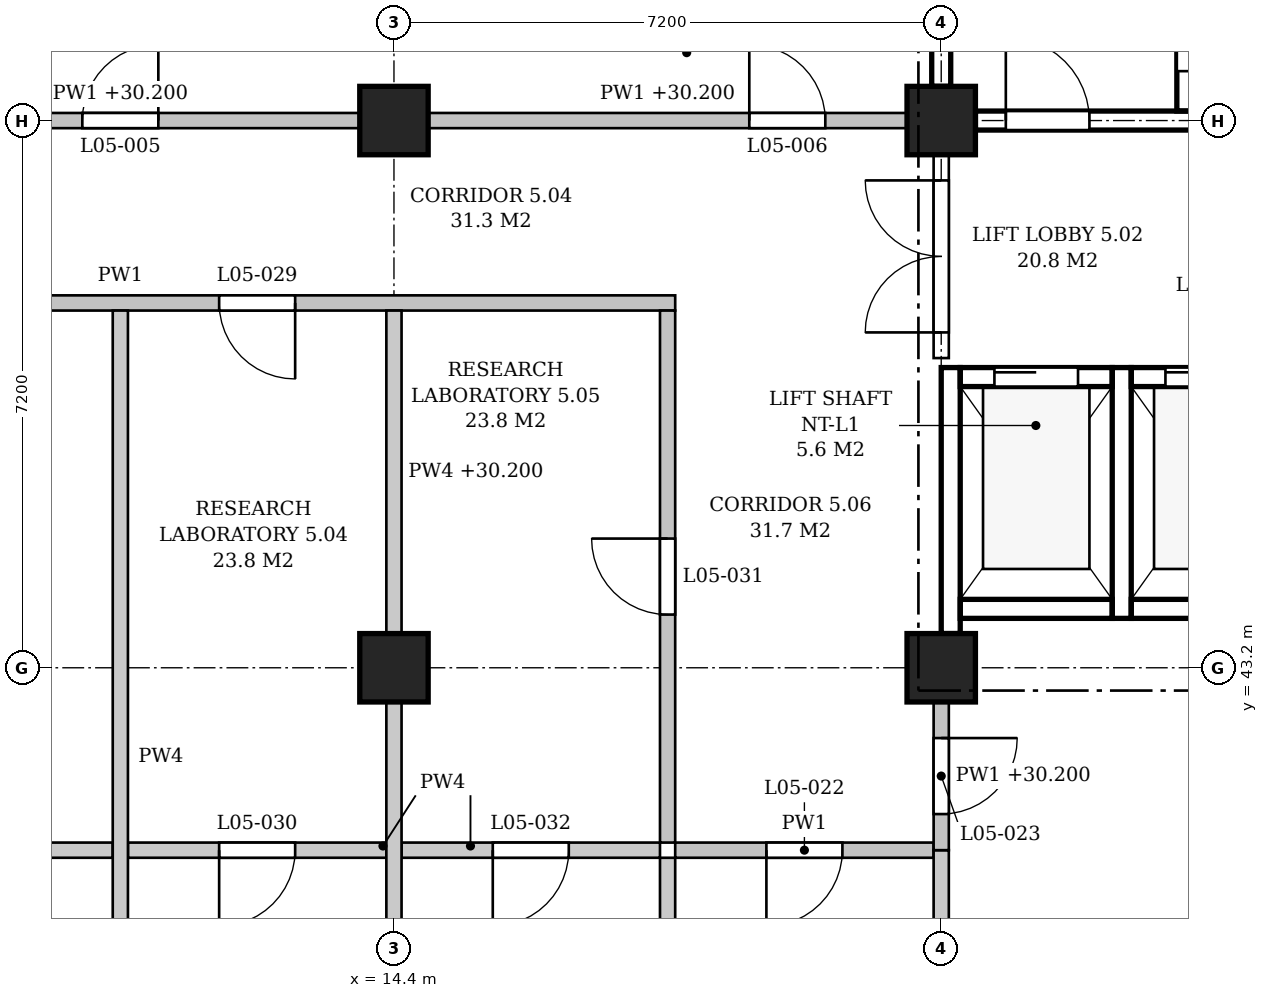
"""IFC4 building model, lengths in metres.
Left out: names, types, materials, properties, quantities, classifications, styles, units other than length and angle.
Written with IfcOpenShell. Run it as: python <this file> out.ifc"""

import sys

from ifc_helpers import new_model, si_unit, direction, frame, frame_2d, origin, origin_2d, place, context, subcontext, project, spatial, polyline, rectangle, outline, extrude, element, fill, save


model = new_model("IFC4")
c1 = context("Model", 3, precision=1e-05, world=origin(), true_north=direction((0.0, 1.0)))
c2 = subcontext(c1, "Body", "Model", "MODEL_VIEW")
j1 = project(units=[si_unit("LENGTHUNIT", "METRE"), si_unit("PLANEANGLEUNIT", "RADIAN")], contexts=[c1])
p1 = place(None, origin())
s1 = spatial("IfcSite", under=j1, at=p1, CompositionType="ELEMENT")
p2 = place(p1, origin())
s2 = spatial("IfcBuilding", under=s1, at=p2, CompositionType="ELEMENT")
p3 = place(p2, frame((0.0, 0.0, 26.4)))
s3 = spatial("IfcBuildingStorey", under=s2, at=p3, CompositionType="ELEMENT", Elevation=26.4)
for number, where, z_axis, x_axis in (
    (1, (14.4, 43.2, 0.0), (0.0, 0.0, 1.0), (1.0, 0.0, 0.0)),
    (2, (14.4, 50.4, 0.0), (0.0, 0.0, 1.0), (1.0, 0.0, 0.0)),
    (3, (21.6, 43.2, 0.0), (0.0, 0.0, 1.0), (1.0, 0.0, 0.0)),
    (4, (21.6, 50.4, 0.0), (0.0, 0.0, 1.0), (1.0, 0.0, 0.0)),
):
    element("IfcColumn", number, at=place(p3, frame(where, z_axis=z_axis, x_axis=x_axis)), inside=s3, PredefinedType="COLUMN", context=c2, shape_type="SweptSolid", body=[
        extrude(rectangle(XDim=0.9, YDim=0.9, at=origin_2d()), origin(), (0.0, 0.0, 1.0), 4.8),
    ])
p4 = place(p3, frame((22.05, 50.4, 0.0), z_axis=(0.0, 0.0, 1.0), x_axis=(1.0, 0.0, 0.0)))
e5 = element("IfcWall", 5, at=p4, inside=s3, PredefinedType="SHEAR", context=c2, shape_type="SweptSolid", body=[
    extrude(rectangle(XDim=6.3, YDim=0.25, at=frame_2d((3.15, 0.0))), origin(), (0.0, 0.0, 1.0), 3.8),
])
p5 = place(p4, frame((0.4, 0.0, 0.0)))
e6 = element("IfcOpeningElement", 6, at=p5, cuts=e5, PredefinedType="OPENING", context=c2, shape_type="SweptSolid", body=[
    extrude(rectangle(XDim=1.1, YDim=2.1, at=frame_2d((0.55, 1.05))), frame((0.0, 0.135, 0.0), z_axis=(0.0, -1.0, 0.0), x_axis=(1.0, 0.0, 0.0)), (0.0, 0.0, 1.0), 0.27),
])
p6 = place(p3, frame((21.6, 50.85, 0.0), z_axis=(0.0, 0.0, 1.0), x_axis=(0.0, 1.0, 0.0)))
e7 = element("IfcWall", 7, at=p6, inside=s3, PredefinedType="SHEAR", context=c2, shape_type="SweptSolid", body=[
    extrude(rectangle(XDim=6.3, YDim=0.25, at=frame_2d((3.15, 0.0))), origin(), (0.0, 0.0, 1.0), 3.8),
])
p7 = place(p3, frame((24.925, 50.525, 0.0), z_axis=(0.0, 0.0, 1.0), x_axis=(0.0, 1.0, 0.0)))
e8 = element("IfcWall", 8, at=p7, inside=s3, PredefinedType="SHEAR", context=c2, shape_type="SweptSolid", body=[
    extrude(rectangle(XDim=6.85, YDim=0.45, at=frame_2d((3.425, 0.0))), origin(), (0.0, 0.0, 1.0), 4.55),
])
p8 = place(p7, frame((0.525, 0.0, 0.0)))
e9 = element("IfcOpeningElement", 9, at=p8, cuts=e8, PredefinedType="OPENING", context=c2, shape_type="SweptSolid", body=[
    extrude(rectangle(XDim=1.0, YDim=2.1, at=frame_2d((0.5, 1.05))), frame((0.0, 0.235, 0.0), z_axis=(0.0, -1.0, 0.0), x_axis=(1.0, 0.0, 0.0)), (0.0, 0.0, 1.0), 0.47),
])
p9 = place(p3, frame((21.725, 43.65, -0.25), z_axis=(0.0, 0.0, 1.0), x_axis=(0.0, 1.0, 0.0)))
e10 = element("IfcWall", 10, at=p9, inside=s3, PredefinedType="SHEAR", context=c2, shape_type="SweptSolid", body=[
    extrude(rectangle(XDim=3.5, YDim=0.25, at=frame_2d((1.75, 0.0))), origin(), (0.0, 0.0, 1.0), 4.05),
])
p10 = place(p3, frame((23.975, 43.85, -0.25), z_axis=(0.0, 0.0, 1.0), x_axis=(0.0, 1.0, 0.0)))
e11 = element("IfcWall", 11, at=p10, inside=s3, PredefinedType="SHEAR", context=c2, shape_type="SweptSolid", body=[
    extrude(rectangle(XDim=3.3, YDim=0.25, at=frame_2d((1.65, 0.0))), origin(), (0.0, 0.0, 1.0), 4.8),
])
p11 = place(p3, frame((21.85, 47.025, -0.25), z_axis=(0.0, 0.0, 1.0), x_axis=(1.0, 0.0, 0.0)))
e12 = element("IfcWall", 12, at=p11, inside=s3, PredefinedType="SHEAR", context=c2, shape_type="SweptSolid", body=[
    extrude(rectangle(XDim=2.0, YDim=0.25, at=frame_2d((1.0, 0.0))), origin(), (0.0, 0.0, 1.0), 4.8),
])
p12 = place(p11, frame((0.45, 0.0, 0.25)))
e13 = element("IfcOpeningElement", 13, at=p12, cuts=e12, PredefinedType="OPENING", context=c2, shape_type="SweptSolid", body=[
    extrude(rectangle(XDim=1.1, YDim=2.1, at=frame_2d((0.55, 1.05))), frame((0.0, 0.135, 0.0), z_axis=(0.0, -1.0, 0.0), x_axis=(1.0, 0.0, 0.0)), (0.0, 0.0, 1.0), 0.27),
])
p13 = place(p3, frame((21.85, 43.975, -0.25), z_axis=(0.0, 0.0, 1.0), x_axis=(1.0, 0.0, 0.0)))
e14 = element("IfcWall", 14, at=p13, inside=s3, PredefinedType="SHEAR", context=c2, shape_type="SweptSolid", body=[
    extrude(rectangle(XDim=2.0, YDim=0.25, at=frame_2d((1.0, 0.0))), origin(), (0.0, 0.0, 1.0), 4.8),
])
p14 = place(p3, frame((24.1, 47.025, -0.25), z_axis=(0.0, 0.0, 1.0), x_axis=(1.0, 0.0, 0.0)))
e15 = element("IfcWall", 15, at=p14, inside=s3, PredefinedType="SHEAR", context=c2, shape_type="SweptSolid", body=[
    extrude(rectangle(XDim=2.0, YDim=0.25, at=frame_2d((1.0, 0.0))), origin(), (0.0, 0.0, 1.0), 4.8),
])
p15 = place(p14, frame((0.45, 0.0, 0.25)))
e16 = element("IfcOpeningElement", 16, at=p15, cuts=e15, PredefinedType="OPENING", context=c2, shape_type="SweptSolid", body=[
    extrude(rectangle(XDim=1.1, YDim=2.1, at=frame_2d((0.55, 1.05))), frame((0.0, 0.135, 0.0), z_axis=(0.0, -1.0, 0.0), x_axis=(1.0, 0.0, 0.0)), (0.0, 0.0, 1.0), 0.27),
])
p16 = place(p3, frame((24.1, 43.975, -0.25), z_axis=(0.0, 0.0, 1.0), x_axis=(1.0, 0.0, 0.0)))
e17 = element("IfcWall", 17, at=p16, inside=s3, PredefinedType="SHEAR", context=c2, shape_type="SweptSolid", body=[
    extrude(rectangle(XDim=2.0, YDim=0.25, at=frame_2d((1.0, 0.0))), origin(), (0.0, 0.0, 1.0), 4.8),
])
p17 = place(p3, frame((3.7, 40.8, 0.0), z_axis=(0.0, 0.0, 1.0), x_axis=(1.0, 0.0, 0.0)))
e18 = element("IfcWall", 18, at=p17, inside=s3, PredefinedType="PARTITIONING", context=c2, shape_type="SweptSolid", body=[
    extrude(outline(polyline([(0.0, 0.0), (7.0, 0.0), (7.0, 4.55), (3.75, 4.55), (3.75, 3.8), (3.25, 3.8), (3.25, 4.55), (0.0, 4.55), (0.0, 0.0)])), frame((0.0, 0.1, 0.0), z_axis=(0.0, -1.0, 0.0), x_axis=(1.0, 0.0, 0.0)), (0.0, 0.0, 1.0), 0.2),
])
p18 = place(p17, frame((1.25, 0.0, 0.0)))
e19 = element("IfcOpeningElement", 19, at=p18, cuts=e18, PredefinedType="OPENING", context=c2, shape_type="SweptSolid", body=[
    extrude(rectangle(XDim=1.0, YDim=2.1, at=frame_2d((0.5, 1.05))), frame((0.0, 0.11, 0.0), z_axis=(0.0, -1.0, 0.0), x_axis=(1.0, 0.0, 0.0)), (0.0, 0.0, 1.0), 0.22),
])
p19 = place(p17, frame((4.75, 0.0, 0.0)))
e20 = element("IfcOpeningElement", 20, at=p19, cuts=e18, PredefinedType="OPENING", context=c2, shape_type="SweptSolid", body=[
    extrude(rectangle(XDim=1.0, YDim=2.1, at=frame_2d((0.5, 1.05))), frame((0.0, 0.11, 0.0), z_axis=(0.0, -1.0, 0.0), x_axis=(1.0, 0.0, 0.0)), (0.0, 0.0, 1.0), 0.22),
])
p20 = place(p3, frame((10.9, 40.8, 0.0), z_axis=(0.0, 0.0, 1.0), x_axis=(1.0, 0.0, 0.0)))
e21 = element("IfcWall", 21, at=p20, inside=s3, PredefinedType="PARTITIONING", context=c2, shape_type="SweptSolid", body=[
    extrude(outline(polyline([(0.0, 0.0), (3.4, 0.0), (3.4, 3.8), (3.25, 3.8), (3.25, 4.55), (0.0, 4.55), (0.0, 0.0)])), frame((0.0, 0.1, 0.0), z_axis=(0.0, -1.0, 0.0), x_axis=(1.0, 0.0, 0.0)), (0.0, 0.0, 1.0), 0.2),
])
p21 = place(p20, frame((1.2, 0.0, 0.0)))
e22 = element("IfcOpeningElement", 22, at=p21, cuts=e21, PredefinedType="OPENING", context=c2, shape_type="SweptSolid", body=[
    extrude(rectangle(XDim=1.0, YDim=2.1, at=frame_2d((0.5, 1.05))), frame((0.0, 0.11, 0.0), z_axis=(0.0, -1.0, 0.0), x_axis=(1.0, 0.0, 0.0)), (0.0, 0.0, 1.0), 0.22),
])
p22 = place(p3, frame((14.5, 40.8, 0.0), z_axis=(0.0, 0.0, 1.0), x_axis=(1.0, 0.0, 0.0)))
e23 = element("IfcWall", 23, at=p22, inside=s3, PredefinedType="PARTITIONING", context=c2, shape_type="SweptSolid", body=[
    extrude(outline(polyline([(0.0, 0.0), (3.4, 0.0), (3.4, 4.55), (0.15, 4.55), (0.15, 3.8), (0.0, 3.8), (0.0, 0.0)])), frame((0.0, 0.1, 0.0), z_axis=(0.0, -1.0, 0.0), x_axis=(1.0, 0.0, 0.0)), (0.0, 0.0, 1.0), 0.2),
])
p23 = place(p22, frame((1.2, 0.0, 0.0)))
e24 = element("IfcOpeningElement", 24, at=p23, cuts=e23, PredefinedType="OPENING", context=c2, shape_type="SweptSolid", body=[
    extrude(rectangle(XDim=1.0, YDim=2.1, at=frame_2d((0.5, 1.05))), frame((0.0, 0.11, 0.0), z_axis=(0.0, -1.0, 0.0), x_axis=(1.0, 0.0, 0.0)), (0.0, 0.0, 1.0), 0.22),
])
p24 = place(p3, frame((18.1, 40.8, 0.0), z_axis=(0.0, 0.0, 1.0), x_axis=(1.0, 0.0, 0.0)))
e25 = element("IfcWall", 25, at=p24, inside=s3, PredefinedType="PARTITIONING", context=c2, shape_type="SweptSolid", body=[
    extrude(outline(polyline([(0.0, 0.0), (3.4, 0.0), (3.4, 3.8), (3.25, 3.8), (3.25, 4.55), (0.0, 4.55), (0.0, 0.0)])), frame((0.0, 0.1, 0.0), z_axis=(0.0, -1.0, 0.0), x_axis=(1.0, 0.0, 0.0)), (0.0, 0.0, 1.0), 0.2),
])
p25 = place(p24, frame((1.2, 0.0, 0.0)))
e26 = element("IfcOpeningElement", 26, at=p25, cuts=e25, PredefinedType="OPENING", context=c2, shape_type="SweptSolid", body=[
    extrude(rectangle(XDim=1.0, YDim=2.1, at=frame_2d((0.5, 1.05))), frame((0.0, 0.11, 0.0), z_axis=(0.0, -1.0, 0.0), x_axis=(1.0, 0.0, 0.0)), (0.0, 0.0, 1.0), 0.22),
])
p26 = place(p3, frame((3.5, 48.0, 0.0), z_axis=(0.0, 0.0, 1.0), x_axis=(1.0, 0.0, 0.0)))
e27 = element("IfcWall", 27, at=p26, inside=s3, PredefinedType="PARTITIONING", context=c2, shape_type="SweptSolid", body=[
    extrude(outline(polyline([(0.0, 0.0), (14.6, 0.0), (14.6, 4.55), (11.15, 4.55), (11.15, 3.8), (10.65, 3.8), (10.65, 4.55), (3.95, 4.55), (3.95, 3.8), (3.45, 3.8), (3.45, 4.55), (0.0, 4.55), (0.0, 0.0)])), frame((0.0, 0.1, 0.0), z_axis=(0.0, -1.0, 0.0), x_axis=(1.0, 0.0, 0.0)), (0.0, 0.0, 1.0), 0.2),
])
p27 = place(p26, frame((3.2, 0.0, 0.0)))
e28 = element("IfcOpeningElement", 28, at=p27, cuts=e27, PredefinedType="OPENING", context=c2, shape_type="SweptSolid", body=[
    extrude(rectangle(XDim=1.0, YDim=2.1, at=frame_2d((0.5, 1.05))), frame((0.0, 0.11, 0.0), z_axis=(0.0, -1.0, 0.0), x_axis=(1.0, 0.0, 0.0)), (0.0, 0.0, 1.0), 0.22),
])
p28 = place(p26, frame((8.6, 0.0, 0.0)))
e29 = element("IfcOpeningElement", 29, at=p28, cuts=e27, PredefinedType="OPENING", context=c2, shape_type="SweptSolid", body=[
    extrude(rectangle(XDim=1.0, YDim=2.1, at=frame_2d((0.5, 1.05))), frame((0.0, 0.11, 0.0), z_axis=(0.0, -1.0, 0.0), x_axis=(1.0, 0.0, 0.0)), (0.0, 0.0, 1.0), 0.22),
])
p29 = place(p3, frame((7.65, 50.4, 0.0), z_axis=(0.0, 0.0, 1.0), x_axis=(1.0, 0.0, 0.0)))
e30 = element("IfcWall", 30, at=p29, inside=s3, PredefinedType="PARTITIONING", context=c2, shape_type="SweptSolid", body=[
    extrude(rectangle(XDim=6.3, YDim=0.2, at=frame_2d((3.15, 0.0))), origin(), (0.0, 0.0, 1.0), 3.8),
])
p30 = place(p29, frame((2.65, 0.0, 0.0)))
e31 = element("IfcOpeningElement", 31, at=p30, cuts=e30, PredefinedType="OPENING", context=c2, shape_type="SweptSolid", body=[
    extrude(rectangle(XDim=1.0, YDim=2.1, at=frame_2d((0.5, 1.05))), frame((0.0, 0.11, 0.0), z_axis=(0.0, -1.0, 0.0), x_axis=(1.0, 0.0, 0.0)), (0.0, 0.0, 1.0), 0.22),
])
p31 = place(p3, frame((14.85, 50.4, 0.0), z_axis=(0.0, 0.0, 1.0), x_axis=(1.0, 0.0, 0.0)))
e32 = element("IfcWall", 32, at=p31, inside=s3, PredefinedType="PARTITIONING", context=c2, shape_type="SweptSolid", body=[
    extrude(rectangle(XDim=6.3, YDim=0.2, at=frame_2d((3.15, 0.0))), origin(), (0.0, 0.0, 1.0), 3.8),
])
p32 = place(p31, frame((4.225, 0.0, 0.0)))
e33 = element("IfcOpeningElement", 33, at=p32, cuts=e32, PredefinedType="OPENING", context=c2, shape_type="SweptSolid", body=[
    extrude(rectangle(XDim=1.0, YDim=2.1, at=frame_2d((0.5, 1.05))), frame((0.0, 0.11, 0.0), z_axis=(0.0, -1.0, 0.0), x_axis=(1.0, 0.0, 0.0)), (0.0, 0.0, 1.0), 0.22),
])
p33 = place(p3, frame((10.8, 36.15, 0.0), z_axis=(0.0, 0.0, 1.0), x_axis=(0.0, 1.0, 0.0)))
e34 = element("IfcWall", 34, at=p33, inside=s3, PredefinedType="PARTITIONING", context=c2, shape_type="SweptSolid", body=[
    extrude(outline(polyline([(0.0, 0.0), (11.75, 0.0), (11.75, 4.55), (7.3, 4.55), (7.3, 3.8), (6.8, 3.8), (6.8, 4.55), (0.1, 4.55), (0.1, 3.95), (0.0, 3.95), (0.0, 0.0)])), frame((0.0, 0.1, 0.0), z_axis=(0.0, -1.0, 0.0), x_axis=(1.0, 0.0, 0.0)), (0.0, 0.0, 1.0), 0.2),
])
p34 = place(p3, frame((14.4, 36.45, 0.0), z_axis=(0.0, 0.0, 1.0), x_axis=(0.0, 1.0, 0.0)))
e35 = element("IfcWall", 35, at=p34, inside=s3, PredefinedType="PARTITIONING", context=c2, shape_type="SweptSolid", body=[
    extrude(rectangle(XDim=6.3, YDim=0.2, at=frame_2d((3.15, 0.0))), origin(), (0.0, 0.0, 1.0), 3.8),
])
p35 = place(p3, frame((14.4, 43.65, 0.0), z_axis=(0.0, 0.0, 1.0), x_axis=(0.0, 1.0, 0.0)))
e36 = element("IfcWall", 36, at=p35, inside=s3, PredefinedType="PARTITIONING", context=c2, shape_type="SweptSolid", body=[
    extrude(rectangle(XDim=4.25, YDim=0.2, at=frame_2d((2.125, 0.0))), origin(), (0.0, 0.0, 1.0), 3.8),
])
p36 = place(p3, frame((18.0, 36.15, 0.0), z_axis=(0.0, 0.0, 1.0), x_axis=(0.0, 1.0, 0.0)))
e37 = element("IfcWall", 37, at=p36, inside=s3, PredefinedType="PARTITIONING", context=c2, shape_type="SweptSolid", body=[
    extrude(outline(polyline([(0.0, 0.0), (4.55, 0.0), (4.55, 4.55), (0.1, 4.55), (0.1, 3.95), (0.0, 3.95), (0.0, 0.0)])), frame((0.0, 0.1, 0.0), z_axis=(0.0, -1.0, 0.0), x_axis=(1.0, 0.0, 0.0)), (0.0, 0.0, 1.0), 0.2),
])
p37 = place(p3, frame((18.0, 40.9, 0.0), z_axis=(0.0, 0.0, 1.0), x_axis=(0.0, 1.0, 0.0)))
e38 = element("IfcWall", 38, at=p37, inside=s3, PredefinedType="PARTITIONING", context=c2, shape_type="SweptSolid", body=[
    extrude(outline(polyline([(0.0, 0.0), (7.0, 0.0), (7.0, 4.55), (2.55, 4.55), (2.55, 3.8), (2.05, 3.8), (2.05, 4.55), (0.0, 4.55), (0.0, 0.0)])), frame((0.0, 0.1, 0.0), z_axis=(0.0, -1.0, 0.0), x_axis=(1.0, 0.0, 0.0)), (0.0, 0.0, 1.0), 0.2),
])
p38 = place(p37, frame((3.0, 0.0, 0.0)))
e39 = element("IfcOpeningElement", 39, at=p38, cuts=e38, PredefinedType="OPENING", context=c2, shape_type="SweptSolid", body=[
    extrude(rectangle(XDim=1.0, YDim=2.1, at=frame_2d((0.5, 1.05))), frame((0.0, 0.11, 0.0), z_axis=(0.0, -1.0, 0.0), x_axis=(1.0, 0.0, 0.0)), (0.0, 0.0, 1.0), 0.22),
])
p39 = place(p3, frame((21.6, 36.45, 0.0), z_axis=(0.0, 0.0, 1.0), x_axis=(0.0, 1.0, 0.0)))
e40 = element("IfcWall", 40, at=p39, inside=s3, PredefinedType="PARTITIONING", context=c2, shape_type="SweptSolid", body=[
    extrude(rectangle(XDim=4.35, YDim=0.2, at=frame_2d((2.175, 0.0))), origin(), (0.0, 0.0, 1.0), 3.8),
])
p40 = place(p3, frame((21.6, 40.8, 0.0), z_axis=(0.0, 0.0, 1.0), x_axis=(0.0, 1.0, 0.0)))
e41 = element("IfcWall", 41, at=p40, inside=s3, PredefinedType="PARTITIONING", context=c2, shape_type="SweptSolid", body=[
    extrude(rectangle(XDim=1.95, YDim=0.2, at=frame_2d((0.975, 0.0))), origin(), (0.0, 0.0, 1.0), 3.8),
])
p41 = place(p40, frame((0.475, 0.0, 0.0)))
e42 = element("IfcOpeningElement", 42, at=p41, cuts=e41, PredefinedType="OPENING", context=c2, shape_type="SweptSolid", body=[
    extrude(rectangle(XDim=1.0, YDim=2.1, at=frame_2d((0.5, 1.05))), frame((0.0, 0.11, 0.0), z_axis=(0.0, -1.0, 0.0), x_axis=(1.0, 0.0, 0.0)), (0.0, 0.0, 1.0), 0.22),
])
p42 = place(p3, frame((21.6, 47.275, 0.0), z_axis=(0.0, 0.0, 1.0), x_axis=(0.0, 1.0, 0.0)))
e43 = element("IfcWall", 43, at=p42, inside=s3, PredefinedType="PARTITIONING", context=c2, shape_type="SweptSolid", body=[
    extrude(rectangle(XDim=2.675, YDim=0.2, at=frame_2d((1.337, 0.0))), origin(), (0.0, 0.0, 1.0), 3.8),
])
p43 = place(p42, frame((0.337, 0.0, 0.0)))
e44 = element("IfcOpeningElement", 44, at=p43, cuts=e43, PredefinedType="OPENING", context=c2, shape_type="SweptSolid", body=[
    extrude(rectangle(XDim=2.0, YDim=2.4, at=frame_2d((1.0, 1.2))), frame((0.0, 0.11, 0.0), z_axis=(0.0, -1.0, 0.0), x_axis=(1.0, 0.0, 0.0)), (0.0, 0.0, 1.0), 0.22),
])
p44 = place(p5, origin())
e45 = element("IfcDoor", 45, at=p44, inside=s3, OperationType="SINGLE_SWING_LEFT", PredefinedType="DOOR", context=c2, shape_type="SweptSolid", body=[
    extrude(rectangle(XDim=1.1, YDim=2.1, at=frame_2d((0.55, 1.05))), frame((0.0, 0.025, 0.0), z_axis=(0.0, -1.0, 0.0), x_axis=(1.0, 0.0, 0.0)), (0.0, 0.0, 1.0), 0.05),
])
fill(e6, e45)
p45 = place(p12, origin())
e46 = element("IfcDoor", 46, at=p45, inside=s3, OperationType="SLIDING_TO_LEFT", PredefinedType="DOOR", context=c2, shape_type="SweptSolid", body=[
    extrude(rectangle(XDim=1.1, YDim=2.1, at=frame_2d((0.55, 1.05))), frame((0.0, 0.025, 0.0), z_axis=(0.0, -1.0, 0.0), x_axis=(1.0, 0.0, 0.0)), (0.0, 0.0, 1.0), 0.05),
])
fill(e13, e46)
p46 = place(p15, origin())
e47 = element("IfcDoor", 47, at=p46, inside=s3, OperationType="SLIDING_TO_LEFT", PredefinedType="DOOR", context=c2, shape_type="SweptSolid", body=[
    extrude(rectangle(XDim=1.1, YDim=2.1, at=frame_2d((0.55, 1.05))), frame((0.0, 0.025, 0.0), z_axis=(0.0, -1.0, 0.0), x_axis=(1.0, 0.0, 0.0)), (0.0, 0.0, 1.0), 0.05),
])
fill(e16, e47)
p47 = place(p43, origin())
e48 = element("IfcDoor", 48, at=p47, inside=s3, OperationType="DOUBLE_DOOR_SINGLE_SWING", PredefinedType="DOOR", context=c2, shape_type="SweptSolid", body=[
    extrude(rectangle(XDim=2.0, YDim=2.4, at=frame_2d((1.0, 1.2))), frame((0.0, 0.025, 0.0), z_axis=(0.0, -1.0, 0.0), x_axis=(1.0, 0.0, 0.0)), (0.0, 0.0, 1.0), 0.05),
])
fill(e44, e48)
p48 = place(p30, origin())
e49 = element("IfcDoor", 49, at=p48, inside=s3, OperationType="SINGLE_SWING_RIGHT", PredefinedType="DOOR", context=c2, shape_type="SweptSolid", body=[
    extrude(rectangle(XDim=1.0, YDim=2.1, at=frame_2d((0.5, 1.05))), frame((0.0, 0.025, 0.0), z_axis=(0.0, -1.0, 0.0), x_axis=(1.0, 0.0, 0.0)), (0.0, 0.0, 1.0), 0.05),
])
fill(e31, e49)
p49 = place(p32, origin())
e50 = element("IfcDoor", 50, at=p49, inside=s3, OperationType="SINGLE_SWING_LEFT", PredefinedType="DOOR", context=c2, shape_type="SweptSolid", body=[
    extrude(rectangle(XDim=1.0, YDim=2.1, at=frame_2d((0.5, 1.05))), frame((0.0, 0.025, 0.0), z_axis=(0.0, -1.0, 0.0), x_axis=(1.0, 0.0, 0.0)), (0.0, 0.0, 1.0), 0.05),
])
fill(e33, e50)
p50 = place(p25, frame((1.0, 0.0, 0.0), z_axis=(0.0, 0.0, 1.0), x_axis=(-1.0, 0.0, 0.0)))
e51 = element("IfcDoor", 51, at=p50, inside=s3, OperationType="SINGLE_SWING_RIGHT", PredefinedType="DOOR", context=c2, shape_type="SweptSolid", body=[
    extrude(rectangle(XDim=1.0, YDim=2.1, at=frame_2d((0.5, 1.05))), frame((0.0, 0.025, 0.0), z_axis=(0.0, -1.0, 0.0), x_axis=(1.0, 0.0, 0.0)), (0.0, 0.0, 1.0), 0.05),
])
fill(e26, e51)
p51 = place(p41, frame((1.0, 0.0, 0.0), z_axis=(0.0, 0.0, 1.0), x_axis=(-1.0, 0.0, 0.0)))
e52 = element("IfcDoor", 52, at=p51, inside=s3, OperationType="SINGLE_SWING_LEFT", PredefinedType="DOOR", context=c2, shape_type="SweptSolid", body=[
    extrude(rectangle(XDim=1.0, YDim=2.1, at=frame_2d((0.5, 1.05))), frame((0.0, 0.025, 0.0), z_axis=(0.0, -1.0, 0.0), x_axis=(1.0, 0.0, 0.0)), (0.0, 0.0, 1.0), 0.05),
])
fill(e42, e52)
p52 = place(p28, frame((1.0, 0.0, 0.0), z_axis=(0.0, 0.0, 1.0), x_axis=(-1.0, 0.0, 0.0)))
e53 = element("IfcDoor", 53, at=p52, inside=s3, OperationType="SINGLE_SWING_LEFT", PredefinedType="DOOR", context=c2, shape_type="SweptSolid", body=[
    extrude(rectangle(XDim=1.0, YDim=2.1, at=frame_2d((0.5, 1.05))), frame((0.0, 0.025, 0.0), z_axis=(0.0, -1.0, 0.0), x_axis=(1.0, 0.0, 0.0)), (0.0, 0.0, 1.0), 0.05),
])
fill(e29, e53)
p53 = place(p21, frame((1.0, 0.0, 0.0), z_axis=(0.0, 0.0, 1.0), x_axis=(-1.0, 0.0, 0.0)))
e54 = element("IfcDoor", 54, at=p53, inside=s3, OperationType="SINGLE_SWING_RIGHT", PredefinedType="DOOR", context=c2, shape_type="SweptSolid", body=[
    extrude(rectangle(XDim=1.0, YDim=2.1, at=frame_2d((0.5, 1.05))), frame((0.0, 0.025, 0.0), z_axis=(0.0, -1.0, 0.0), x_axis=(1.0, 0.0, 0.0)), (0.0, 0.0, 1.0), 0.05),
])
fill(e22, e54)
p54 = place(p38, origin())
e55 = element("IfcDoor", 55, at=p54, inside=s3, OperationType="SINGLE_SWING_RIGHT", PredefinedType="DOOR", context=c2, shape_type="SweptSolid", body=[
    extrude(rectangle(XDim=1.0, YDim=2.1, at=frame_2d((0.5, 1.05))), frame((0.0, 0.025, 0.0), z_axis=(0.0, -1.0, 0.0), x_axis=(1.0, 0.0, 0.0)), (0.0, 0.0, 1.0), 0.05),
])
fill(e39, e55)
p55 = place(p23, frame((1.0, 0.0, 0.0), z_axis=(0.0, 0.0, 1.0), x_axis=(-1.0, 0.0, 0.0)))
e56 = element("IfcDoor", 56, at=p55, inside=s3, OperationType="SINGLE_SWING_RIGHT", PredefinedType="DOOR", context=c2, shape_type="SweptSolid", body=[
    extrude(rectangle(XDim=1.0, YDim=2.1, at=frame_2d((0.5, 1.05))), frame((0.0, 0.025, 0.0), z_axis=(0.0, -1.0, 0.0), x_axis=(1.0, 0.0, 0.0)), (0.0, 0.0, 1.0), 0.05),
])
fill(e24, e56)
save(model, sys.argv[1])
